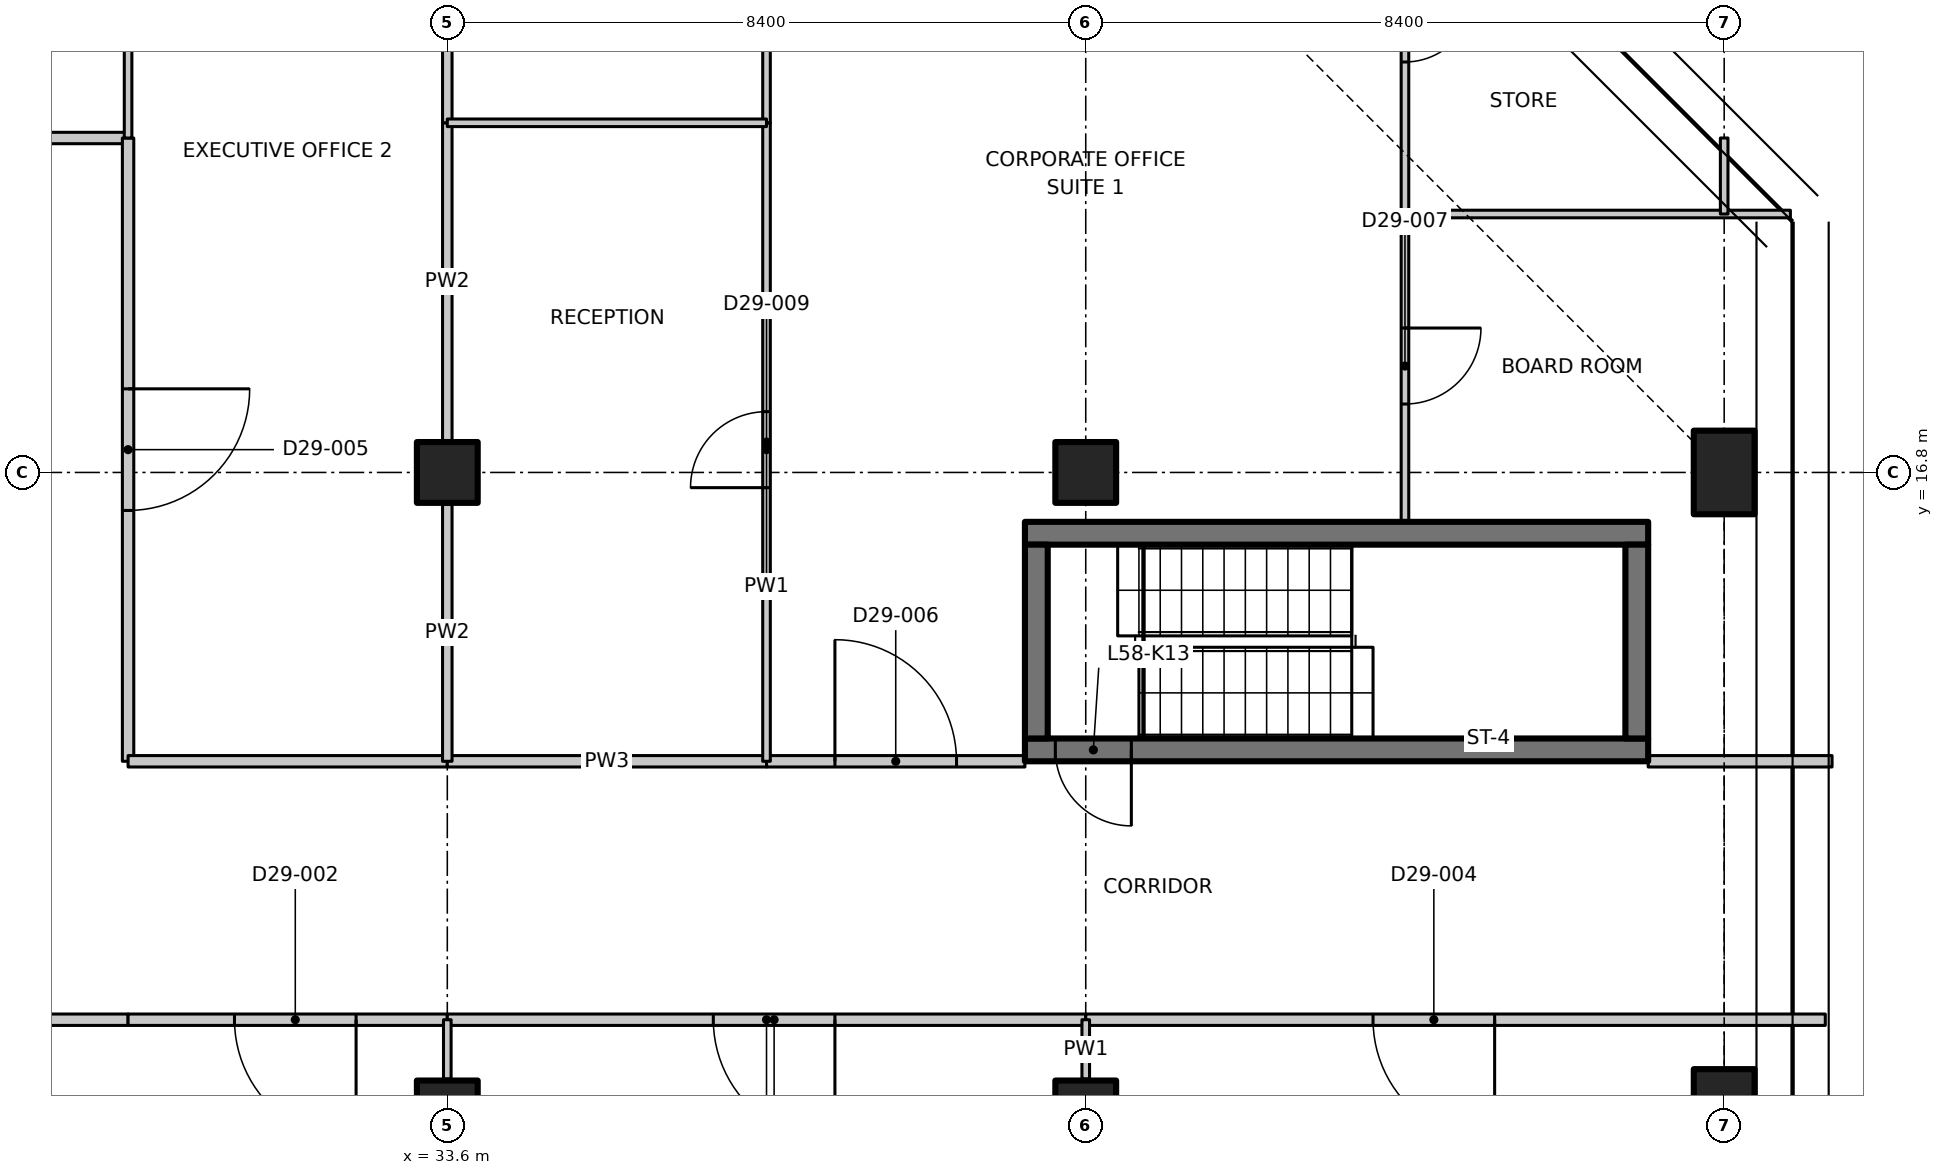
"""IFC4 building model, lengths in metres.
Left out: names, types, materials, properties, quantities, classifications, styles, units other than length and angle.
Written with IfcOpenShell. Run it as: python <this file> out.ifc"""

import sys

from ifc_helpers import new_model, si_unit, direction, frame, frame_2d, origin, origin_2d, place, context, subcontext, project, spatial, polyline, rectangle, outline, extrude, element, fill, save


model = new_model("IFC4")
c1 = context("Model", 3, precision=1e-05, world=origin(), true_north=direction((0.0, 1.0)))
c2 = subcontext(c1, "Body", "Model", "MODEL_VIEW")
j1 = project(units=[si_unit("LENGTHUNIT", "METRE"), si_unit("PLANEANGLEUNIT", "RADIAN")], contexts=[c1])
p1 = place(None, origin())
s1 = spatial("IfcSite", under=j1, at=p1, CompositionType="ELEMENT")
p2 = place(p1, origin())
s2 = spatial("IfcBuilding", under=s1, at=p2, CompositionType="ELEMENT")
p3 = place(p2, frame((0.0, 0.0, 230.1)))
s3 = spatial("IfcBuildingStorey", under=s2, at=p3, CompositionType="ELEMENT", Elevation=230.1)
for number, where, z_axis, x_axis in (
    (1, (33.6, 8.4, 0.0), (0.0, 0.0, 1.0), (1.0, 0.0, 0.0)),
    (2, (33.6, 16.8, 0.0), (0.0, 0.0, 1.0), (1.0, 0.0, 0.0)),
    (3, (42.0, 8.4, 0.0), (0.0, 0.0, 1.0), (1.0, 0.0, 0.0)),
    (4, (42.0, 16.8, 0.0), (0.0, 0.0, 1.0), (1.0, 0.0, 0.0)),
):
    element("IfcColumn", number, at=place(p3, frame(where, z_axis=z_axis, x_axis=x_axis)), inside=s3, PredefinedType="COLUMN", context=c2, shape_type="SweptSolid", body=[
        extrude(rectangle(XDim=0.8, YDim=0.8, at=origin_2d()), origin(), (0.0, 0.0, 1.0), 3.35),
    ])
for number, where, z_axis, x_axis in (
    (5, (50.4, 8.4, 0.0), (0.0, 0.0, 1.0), (1.0, 0.0, 0.0)),
    (6, (50.4, 16.8, 0.0), (0.0, 0.0, 1.0), (1.0, 0.0, 0.0)),
):
    element("IfcColumn", number, at=place(p3, frame(where, z_axis=z_axis, x_axis=x_axis)), inside=s3, PredefinedType="COLUMN", context=c2, shape_type="SweptSolid", body=[
        extrude(rectangle(XDim=0.8, YDim=1.1, at=origin_2d()), origin(), (0.0, 0.0, 1.0), 3.35),
    ])
p4 = place(p3, frame((49.4, 13.15, 0.0), z_axis=(0.0, 0.0, 1.0), x_axis=(-1.0, 0.0, 0.0)))
e7 = element("IfcWall", 7, at=p4, inside=s3, PredefinedType="SHEAR", context=c2, shape_type="SweptSolid", body=[
    extrude(rectangle(XDim=8.2, YDim=0.3, at=frame_2d((4.1, 0.0))), origin(), (0.0, 0.0, 1.0), 3.35),
])
p5 = place(p4, frame((6.8, 0.0, 0.0)))
e8 = element("IfcOpeningElement", 8, at=p5, cuts=e7, PredefinedType="OPENING", context=c2, shape_type="SweptSolid", body=[
    extrude(rectangle(XDim=1.0, YDim=2.1, at=frame_2d((0.5, 1.05))), frame((0.0, 0.16, 0.0), z_axis=(0.0, -1.0, 0.0), x_axis=(1.0, 0.0, 0.0)), (0.0, 0.0, 1.0), 0.32),
])
p6 = place(p3, frame((41.2, 16.0, 0.0), z_axis=(0.0, 0.0, 1.0), x_axis=(1.0, 0.0, 0.0)))
e9 = element("IfcWall", 9, at=p6, inside=s3, PredefinedType="SHEAR", context=c2, shape_type="SweptSolid", body=[
    extrude(rectangle(XDim=8.2, YDim=0.3, at=frame_2d((4.1, 0.0))), origin(), (0.0, 0.0, 1.0), 3.35),
])
for number, where, z_axis, x_axis in (
    (10, (41.35, 13.3, 0.0), (0.0, 0.0, 1.0), (0.0, 1.0, 0.0)),
    (11, (49.25, 13.3, 0.0), (0.0, 0.0, 1.0), (0.0, 1.0, 0.0)),
):
    element("IfcWall", number, at=place(p3, frame(where, z_axis=z_axis, x_axis=x_axis)), inside=s3, PredefinedType="SHEAR", context=c2, shape_type="SweptSolid", body=[
        extrude(rectangle(XDim=2.55, YDim=0.3, at=frame_2d((1.275, 0.0))), origin(), (0.0, 0.0, 1.0), 3.35),
    ])
p7 = place(p3, frame((25.2, 21.2, 0.0), z_axis=(0.0, 0.0, 1.0), x_axis=(1.0, 0.0, 0.0)))
e12 = element("IfcWall", 12, at=p7, inside=s3, PredefinedType="PARTITIONING", context=c2, shape_type="SweptSolid", body=[
    extrude(rectangle(XDim=4.2, YDim=0.15, at=frame_2d((2.1, 0.0))), origin(), (0.0, 0.0, 1.0), 3.33),
])
p8 = place(p7, frame((1.5, 0.0, 0.0)))
e13 = element("IfcOpeningElement", 13, at=p8, cuts=e12, PredefinedType="OPENING", context=c2, shape_type="SweptSolid", body=[
    extrude(rectangle(XDim=1.0, YDim=2.1, at=frame_2d((0.5, 1.05))), frame((0.0, 0.085, 0.0), z_axis=(0.0, -1.0, 0.0), x_axis=(1.0, 0.0, 0.0)), (0.0, 0.0, 1.0), 0.17),
])
p9 = place(p3, frame((29.4, 9.6, 0.0), z_axis=(0.0, 0.0, 1.0), x_axis=(-1.0, 0.0, 0.0)))
e14 = element("IfcWall", 14, at=p9, inside=s3, PredefinedType="PARTITIONING", context=c2, shape_type="SweptSolid", body=[
    extrude(rectangle(XDim=4.2, YDim=0.15, at=frame_2d((2.1, 0.0))), origin(), (0.0, 0.0, 1.0), 3.33),
])
p10 = place(p3, frame((29.4, 21.2, 0.0), z_axis=(0.0, 0.0, 1.0), x_axis=(0.0, -1.0, 0.0)))
e15 = element("IfcWall", 15, at=p10, inside=s3, PredefinedType="PARTITIONING", context=c2, shape_type="SweptSolid", body=[
    extrude(rectangle(XDim=8.2, YDim=0.15, at=frame_2d((4.1, 0.0))), origin(), (0.0, 0.0, 1.0), 3.33),
])
p11 = place(p10, frame((3.3, 0.0, 0.0)))
e16 = element("IfcOpeningElement", 16, at=p11, cuts=e15, PredefinedType="OPENING", context=c2, shape_type="SweptSolid", body=[
    extrude(rectangle(XDim=1.6, YDim=2.1, at=frame_2d((0.8, 1.05))), frame((0.0, 0.085, 0.0), z_axis=(0.0, -1.0, 0.0), x_axis=(1.0, 0.0, 0.0)), (0.0, 0.0, 1.0), 0.17),
])
p12 = place(p3, frame((29.4, 27.429, 0.0), z_axis=(0.0, 0.0, 1.0), x_axis=(0.0, -1.0, 0.0)))
e17 = element("IfcWall", 17, at=p12, inside=s3, PredefinedType="PARTITIONING", context=c2, shape_type="SweptSolid", body=[
    extrude(outline(polyline([(0.0, 0.0), (6.229, 0.0), (6.229, 3.33), (2.679, 3.33), (2.677, 2.98), (1.781, 2.98), (1.779, 3.33), (0.154, 3.33), (0.0, 3.33), (0.0, 0.0)])), frame((0.0, 0.05, 0.0), z_axis=(0.0, -1.0, 0.0), x_axis=(1.0, 0.0, 0.0)), (0.0, 0.0, 1.0), 0.1),
])
p13 = place(p3, frame((33.6, 9.6, 0.0), z_axis=(0.0, 0.0, 1.0), x_axis=(-1.0, 0.0, 0.0)))
e18 = element("IfcWall", 18, at=p13, inside=s3, PredefinedType="PARTITIONING", context=c2, shape_type="SweptSolid", body=[
    extrude(rectangle(XDim=4.2, YDim=0.15, at=frame_2d((2.1, 0.0))), origin(), (0.0, 0.0, 1.0), 3.33),
])
p14 = place(p13, frame((1.2, 0.0, 0.0)))
e19 = element("IfcOpeningElement", 19, at=p14, cuts=e18, PredefinedType="OPENING", context=c2, shape_type="SweptSolid", body=[
    extrude(rectangle(XDim=1.6, YDim=2.1, at=frame_2d((0.8, 1.05))), frame((0.0, 0.085, 0.0), z_axis=(0.0, -1.0, 0.0), x_axis=(1.0, 0.0, 0.0)), (0.0, 0.0, 1.0), 0.17),
])
p15 = place(p3, frame((42.0, 9.6, 0.0), z_axis=(0.0, 0.0, 1.0), x_axis=(-1.0, 0.0, 0.0)))
e20 = element("IfcWall", 20, at=p15, inside=s3, PredefinedType="PARTITIONING", context=c2, shape_type="SweptSolid", body=[
    extrude(rectangle(XDim=8.4, YDim=0.15, at=frame_2d((4.2, 0.0))), origin(), (0.0, 0.0, 1.0), 3.33),
])
p16 = place(p15, frame((3.3, 0.0, 0.0)))
e21 = element("IfcOpeningElement", 21, at=p16, cuts=e20, PredefinedType="OPENING", context=c2, shape_type="SweptSolid", body=[
    extrude(rectangle(XDim=1.6, YDim=2.1, at=frame_2d((0.8, 1.05))), frame((0.0, 0.085, 0.0), z_axis=(0.0, -1.0, 0.0), x_axis=(1.0, 0.0, 0.0)), (0.0, 0.0, 1.0), 0.17),
])
p17 = place(p3, frame((51.73, 9.6, 0.0), z_axis=(0.0, 0.0, 1.0), x_axis=(-1.0, 0.0, 0.0)))
e22 = element("IfcWall", 22, at=p17, inside=s3, PredefinedType="PARTITIONING", context=c2, shape_type="SweptSolid", body=[
    extrude(outline(polyline([(0.0, 0.0), (9.73, 0.0), (9.73, 3.33), (1.781, 3.33), (1.779, 2.98), (0.883, 2.98), (0.881, 3.33), (0.25, 3.33), (0.0, 3.33), (0.0, 0.0)])), frame((0.0, 0.075, 0.0), z_axis=(0.0, -1.0, 0.0), x_axis=(1.0, 0.0, 0.0)), (0.0, 0.0, 1.0), 0.15),
])
p18 = place(p17, frame((4.351, 0.0, 0.0)))
e23 = element("IfcOpeningElement", 23, at=p18, cuts=e22, PredefinedType="OPENING", context=c2, shape_type="SweptSolid", body=[
    extrude(rectangle(XDim=1.6, YDim=2.1, at=frame_2d((0.8, 1.05))), frame((0.0, 0.085, 0.0), z_axis=(0.0, -1.0, 0.0), x_axis=(1.0, 0.0, 0.0)), (0.0, 0.0, 1.0), 0.17),
])
p19 = place(p3, frame((29.4, 13.0, 0.0), z_axis=(0.0, 0.0, 1.0), x_axis=(1.0, 0.0, 0.0)))
e24 = element("IfcWall", 24, at=p19, inside=s3, PredefinedType="PARTITIONING", context=c2, shape_type="SweptSolid", body=[
    extrude(rectangle(XDim=4.2, YDim=0.15, at=frame_2d((2.1, 0.0))), origin(), (0.0, 0.0, 1.0), 3.33),
])
p20 = place(p3, frame((37.8, 13.0, 0.0), z_axis=(0.0, 0.0, 1.0), x_axis=(1.0, 0.0, 0.0)))
e25 = element("IfcWall", 25, at=p20, inside=s3, PredefinedType="PARTITIONING", context=c2, shape_type="SweptSolid", body=[
    extrude(rectangle(XDim=3.4, YDim=0.15, at=frame_2d((1.7, 0.0))), origin(), (0.0, 0.0, 1.0), 3.33),
])
p21 = place(p20, frame((0.9, 0.0, 0.0)))
e26 = element("IfcOpeningElement", 26, at=p21, cuts=e25, PredefinedType="OPENING", context=c2, shape_type="SweptSolid", body=[
    extrude(rectangle(XDim=1.6, YDim=2.1, at=frame_2d((0.8, 1.05))), frame((0.0, 0.085, 0.0), z_axis=(0.0, -1.0, 0.0), x_axis=(1.0, 0.0, 0.0)), (0.0, 0.0, 1.0), 0.17),
])
p22 = place(p3, frame((49.4, 13.0, 0.0), z_axis=(0.0, 0.0, 1.0), x_axis=(1.0, 0.0, 0.0)))
e27 = element("IfcWall", 27, at=p22, inside=s3, PredefinedType="PARTITIONING", context=c2, shape_type="SweptSolid", body=[
    extrude(rectangle(XDim=2.42, YDim=0.15, at=frame_2d((1.21, 0.0))), origin(), (0.0, 0.0, 1.0), 2.98),
])
p23 = place(p3, frame((33.6, 13.0, 0.0), z_axis=(0.0, 0.0, 1.0), x_axis=(1.0, 0.0, 0.0)))
e28 = element("IfcWall", 28, at=p23, inside=s3, PredefinedType="PARTITIONING", context=c2, shape_type="SweptSolid", body=[
    extrude(rectangle(XDim=4.2, YDim=0.15, at=frame_2d((2.1, 0.0))), origin(), (0.0, 0.0, 1.0), 3.33),
])
for number, where, z_axis, x_axis in (
    (29, (33.6, 9.6, 0.0), (0.0, 0.0, 1.0), (0.0, -1.0, 0.0)),
    (30, (42.0, 9.6, 0.0), (0.0, 0.0, 1.0), (0.0, -1.0, 0.0)),
):
    element("IfcWall", number, at=place(p3, frame(where, z_axis=z_axis, x_axis=x_axis)), inside=s3, PredefinedType="PARTITIONING", context=c2, shape_type="SweptSolid", body=[
        extrude(rectangle(XDim=0.78, YDim=0.1, at=frame_2d((0.39, 0.0))), origin(), (0.0, 0.0, 1.0), 3.33),
    ])
p24 = place(p3, frame((33.6, 21.4, 0.0), z_axis=(0.0, 0.0, 1.0), x_axis=(0.0, -1.0, 0.0)))
e31 = element("IfcWall", 31, at=p24, inside=s3, PredefinedType="PARTITIONING", context=c2, shape_type="SweptSolid", body=[
    extrude(rectangle(XDim=4.18, YDim=0.125, at=frame_2d((2.09, 0.0))), origin(), (0.0, 0.0, 1.0), 3.33),
])
p25 = place(p3, frame((33.6, 16.38, 0.0), z_axis=(0.0, 0.0, 1.0), x_axis=(0.0, -1.0, 0.0)))
e32 = element("IfcWall", 32, at=p25, inside=s3, PredefinedType="PARTITIONING", context=c2, shape_type="SweptSolid", body=[
    extrude(rectangle(XDim=3.38, YDim=0.125, at=frame_2d((1.69, 0.0))), origin(), (0.0, 0.0, 1.0), 3.33),
])
p26 = place(p3, frame((33.6, 24.805, 0.0), z_axis=(0.0, 0.0, 1.0), x_axis=(0.0, -1.0, 0.0)))
e33 = element("IfcWall", 33, at=p26, inside=s3, PredefinedType="PARTITIONING", context=c2, shape_type="SweptSolid", body=[
    extrude(rectangle(XDim=3.405, YDim=0.125, at=frame_2d((1.703, 0.0))), origin(), (0.0, 0.0, 1.0), 2.98),
])
p27 = place(p3, frame((46.2, 20.2, 0.0), z_axis=(0.0, 0.0, 1.0), x_axis=(0.0, -1.0, 0.0)))
e34 = element("IfcWall", 34, at=p27, inside=s3, PredefinedType="PARTITIONING", context=c2, shape_type="SweptSolid", body=[
    extrude(rectangle(XDim=4.05, YDim=0.1, at=frame_2d((2.025, 0.0))), origin(), (0.0, 0.0, 1.0), 3.33),
])
p28 = place(p27, frame((1.5, 0.0, 0.0)))
e35 = element("IfcOpeningElement", 35, at=p28, cuts=e34, PredefinedType="OPENING", context=c2, shape_type="SweptSolid", body=[
    extrude(rectangle(XDim=1.0, YDim=2.1, at=frame_2d((0.5, 1.05))), frame((0.0, 0.06, 0.0), z_axis=(0.0, -1.0, 0.0), x_axis=(1.0, 0.0, 0.0)), (0.0, 0.0, 1.0), 0.12),
])
p29 = place(p3, frame((46.2, 25.502, 0.0), z_axis=(0.0, 0.0, 1.0), x_axis=(0.0, -1.0, 0.0)))
e36 = element("IfcWall", 36, at=p29, inside=s3, PredefinedType="PARTITIONING", context=c2, shape_type="SweptSolid", body=[
    extrude(outline(polyline([(0.0, 0.0), (5.302, 0.0), (5.302, 3.33), (5.168, 3.33), (5.166, 2.98), (3.839, 2.98), (3.837, 3.33), (0.103, 3.33), (0.0, 3.33), (0.0, 0.0)])), frame((0.0, 0.05, 0.0), z_axis=(0.0, -1.0, 0.0), x_axis=(1.0, 0.0, 0.0)), (0.0, 0.0, 1.0), 0.1),
])
p30 = place(p29, frame((2.403, 0.0, 0.0)))
e37 = element("IfcOpeningElement", 37, at=p30, cuts=e36, PredefinedType="OPENING", context=c2, shape_type="SweptSolid", body=[
    extrude(rectangle(XDim=0.9, YDim=2.1, at=frame_2d((0.45, 1.05))), frame((0.0, 0.06, 0.0), z_axis=(0.0, -1.0, 0.0), x_axis=(1.0, 0.0, 0.0)), (0.0, 0.0, 1.0), 0.12),
])
p31 = place(p3, frame((37.8, 13.0, 0.0), z_axis=(0.0, 0.0, 1.0), x_axis=(0.0, 1.0, 0.0)))
e38 = element("IfcWall", 38, at=p31, inside=s3, PredefinedType="PARTITIONING", context=c2, shape_type="SweptSolid", body=[
    extrude(rectangle(XDim=8.4, YDim=0.1, at=frame_2d((4.2, 0.0))), origin(), (0.0, 0.0, 1.0), 3.33),
])
p32 = place(p31, frame((3.6, 0.0, 0.0)))
e39 = element("IfcOpeningElement", 39, at=p32, cuts=e38, PredefinedType="OPENING", context=c2, shape_type="SweptSolid", body=[
    extrude(rectangle(XDim=1.0, YDim=2.1, at=frame_2d((0.5, 1.05))), frame((0.0, 0.06, 0.0), z_axis=(0.0, -1.0, 0.0), x_axis=(1.0, 0.0, 0.0)), (0.0, 0.0, 1.0), 0.12),
])
p33 = place(p3, frame((37.8, 21.4, 0.0), z_axis=(0.0, 0.0, 1.0), x_axis=(0.0, 1.0, 0.0)))
e40 = element("IfcWall", 40, at=p33, inside=s3, PredefinedType="PARTITIONING", context=c2, shape_type="SweptSolid", body=[
    extrude(outline(polyline([(0.0, 0.0), (8.843, 0.0), (8.843, 3.33), (4.25, 3.33), (4.248, 2.98), (3.352, 2.98), (3.35, 3.33), (0.0, 3.33), (0.0, 0.0)])), frame((0.0, 0.05, 0.0), z_axis=(0.0, -1.0, 0.0), x_axis=(1.0, 0.0, 0.0)), (0.0, 0.0, 1.0), 0.1),
])
p34 = place(p33, frame((3.9, 0.0, 0.0)))
e41 = element("IfcOpeningElement", 41, at=p34, cuts=e40, PredefinedType="OPENING", context=c2, shape_type="SweptSolid", body=[
    extrude(rectangle(XDim=1.0, YDim=2.1, at=frame_2d((0.5, 1.05))), frame((0.0, 0.06, 0.0), z_axis=(0.0, -1.0, 0.0), x_axis=(1.0, 0.0, 0.0)), (0.0, 0.0, 1.0), 0.12),
])
p35 = place(p3, frame((46.2, 20.2, 0.0), z_axis=(0.0, 0.0, 1.0), x_axis=(1.0, 0.0, 0.0)))
e42 = element("IfcWall", 42, at=p35, inside=s3, PredefinedType="PARTITIONING", context=c2, shape_type="SweptSolid", body=[
    extrude(rectangle(XDim=5.071, YDim=0.1, at=frame_2d((2.536, 0.0))), origin(), (0.0, 0.0, 1.0), 2.98),
])
p36 = place(p3, frame((50.4, 20.2, 0.0), z_axis=(0.0, 0.0, 1.0), x_axis=(0.0, 1.0, 0.0)))
e43 = element("IfcWall", 43, at=p36, inside=s3, PredefinedType="PARTITIONING", context=c2, shape_type="SweptSolid", body=[
    extrude(rectangle(XDim=1.0, YDim=0.1, at=frame_2d((0.5, 0.0))), origin(), (0.0, 0.0, 1.0), 3.33),
])
p37 = place(p3, frame((33.6, 21.4, 0.0), z_axis=(0.0, 0.0, 1.0), x_axis=(1.0, 0.0, 0.0)))
e44 = element("IfcWall", 44, at=p37, inside=s3, PredefinedType="PARTITIONING", context=c2, shape_type="SweptSolid", body=[
    extrude(rectangle(XDim=4.2, YDim=0.1, at=frame_2d((2.1, 0.0))), origin(), (0.0, 0.0, 1.0), 3.33),
])
p38 = place(p5, origin())
e45 = element("IfcDoor", 45, at=p38, inside=s3, OperationType="SINGLE_SWING_RIGHT", PredefinedType="DOOR", context=c2, shape_type="SweptSolid", body=[
    extrude(rectangle(XDim=1.0, YDim=2.1, at=frame_2d((0.5, 1.05))), frame((0.0, 0.025, 0.0), z_axis=(0.0, -1.0, 0.0), x_axis=(1.0, 0.0, 0.0)), (0.0, 0.0, 1.0), 0.05),
])
fill(e8, e45)
p39 = place(p14, origin())
e46 = element("IfcDoor", 46, at=p39, inside=s3, OperationType="DOUBLE_DOOR_SINGLE_SWING", PredefinedType="DOOR", context=c2, shape_type="SweptSolid", body=[
    extrude(rectangle(XDim=1.6, YDim=2.1, at=frame_2d((0.8, 1.05))), frame((0.0, 0.025, 0.0), z_axis=(0.0, -1.0, 0.0), x_axis=(1.0, 0.0, 0.0)), (0.0, 0.0, 1.0), 0.05),
])
fill(e19, e46)
p40 = place(p16, origin())
e47 = element("IfcDoor", 47, at=p40, inside=s3, OperationType="DOUBLE_DOOR_SINGLE_SWING", PredefinedType="DOOR", context=c2, shape_type="SweptSolid", body=[
    extrude(rectangle(XDim=1.6, YDim=2.1, at=frame_2d((0.8, 1.05))), frame((0.0, 0.025, 0.0), z_axis=(0.0, -1.0, 0.0), x_axis=(1.0, 0.0, 0.0)), (0.0, 0.0, 1.0), 0.05),
])
fill(e21, e47)
p41 = place(p18, origin())
e48 = element("IfcDoor", 48, at=p41, inside=s3, OperationType="DOUBLE_DOOR_SINGLE_SWING", PredefinedType="DOOR", context=c2, shape_type="SweptSolid", body=[
    extrude(rectangle(XDim=1.6, YDim=2.1, at=frame_2d((0.8, 1.05))), frame((0.0, 0.025, 0.0), z_axis=(0.0, -1.0, 0.0), x_axis=(1.0, 0.0, 0.0)), (0.0, 0.0, 1.0), 0.05),
])
fill(e23, e48)
p42 = place(p11, origin())
e49 = element("IfcDoor", 49, at=p42, inside=s3, OperationType="DOUBLE_DOOR_SINGLE_SWING", PredefinedType="DOOR", context=c2, shape_type="SweptSolid", body=[
    extrude(rectangle(XDim=1.6, YDim=2.1, at=frame_2d((0.8, 1.05))), frame((0.0, 0.025, 0.0), z_axis=(0.0, -1.0, 0.0), x_axis=(1.0, 0.0, 0.0)), (0.0, 0.0, 1.0), 0.05),
])
fill(e16, e49)
p43 = place(p21, origin())
e50 = element("IfcDoor", 50, at=p43, inside=s3, OperationType="DOUBLE_DOOR_SINGLE_SWING", PredefinedType="DOOR", context=c2, shape_type="SweptSolid", body=[
    extrude(rectangle(XDim=1.6, YDim=2.1, at=frame_2d((0.8, 1.05))), frame((0.0, 0.025, 0.0), z_axis=(0.0, -1.0, 0.0), x_axis=(1.0, 0.0, 0.0)), (0.0, 0.0, 1.0), 0.05),
])
fill(e26, e50)
p44 = place(p28, origin())
e51 = element("IfcDoor", 51, at=p44, inside=s3, OperationType="SINGLE_SWING_LEFT", PredefinedType="DOOR", context=c2, shape_type="SweptSolid", body=[
    extrude(rectangle(XDim=1.0, YDim=2.1, at=frame_2d((0.5, 1.05))), frame((0.0, 0.025, 0.0), z_axis=(0.0, -1.0, 0.0), x_axis=(1.0, 0.0, 0.0)), (0.0, 0.0, 1.0), 0.05),
])
fill(e35, e51)
p45 = place(p30, origin())
e52 = element("IfcDoor", 52, at=p45, inside=s3, OperationType="SINGLE_SWING_LEFT", PredefinedType="DOOR", context=c2, shape_type="SweptSolid", body=[
    extrude(rectangle(XDim=0.9, YDim=2.1, at=frame_2d((0.45, 1.05))), frame((0.0, 0.025, 0.0), z_axis=(0.0, -1.0, 0.0), x_axis=(1.0, 0.0, 0.0)), (0.0, 0.0, 1.0), 0.05),
])
fill(e37, e52)
p46 = place(p32, origin())
e53 = element("IfcDoor", 53, at=p46, inside=s3, OperationType="SINGLE_SWING_LEFT", PredefinedType="DOOR", context=c2, shape_type="SweptSolid", body=[
    extrude(rectangle(XDim=1.0, YDim=2.1, at=frame_2d((0.5, 1.05))), frame((0.0, 0.025, 0.0), z_axis=(0.0, -1.0, 0.0), x_axis=(1.0, 0.0, 0.0)), (0.0, 0.0, 1.0), 0.05),
])
fill(e39, e53)
save(model, sys.argv[1])
